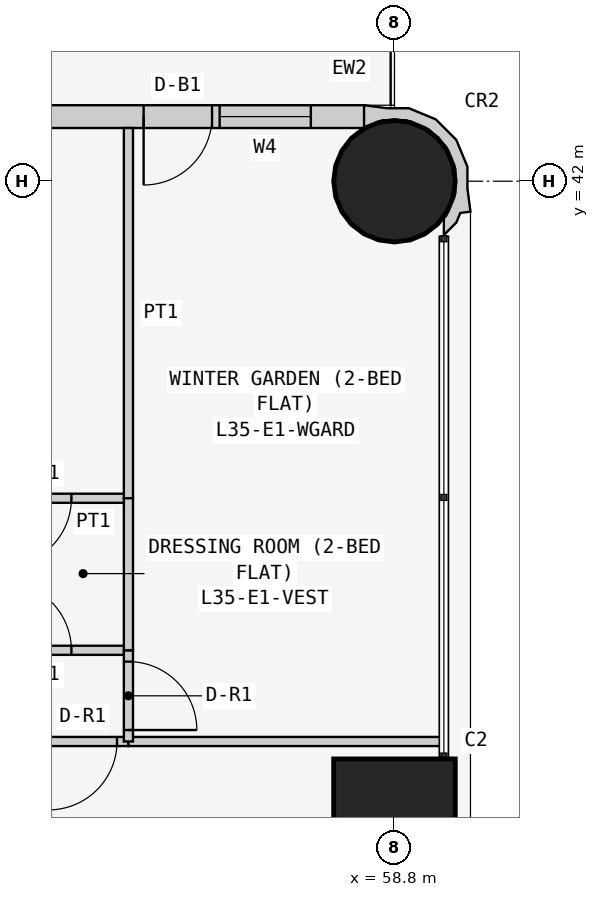
"""IFC4 building model, lengths in metres.
Left out: names, types, materials, properties, quantities, classifications, styles, units other than length and angle.
Written with IfcOpenShell. Run it as: python <this file> out.ifc"""

import sys

from ifc_helpers import new_model, si_unit, direction, frame, frame_2d, origin, origin_2d, place, context, subcontext, project, spatial, polyline, rectangle, circle, outline, extrude, element, fill, save


model = new_model("IFC4")
c1 = context("Model", 3, precision=1e-05, world=origin(), true_north=direction((0.0, 1.0)))
c2 = subcontext(c1, "Body", "Model", "MODEL_VIEW")
j1 = project(units=[si_unit("LENGTHUNIT", "METRE"), si_unit("PLANEANGLEUNIT", "RADIAN")], contexts=[c1])
p1 = place(None, origin())
s1 = spatial("IfcSite", under=j1, at=p1, CompositionType="ELEMENT")
p2 = place(p1, origin())
s2 = spatial("IfcBuilding", under=s1, at=p2, CompositionType="ELEMENT")
p3 = place(p2, frame((0.0, 0.0, 137.7)))
s3 = spatial("IfcBuildingStorey", under=s2, at=p3, CompositionType="ELEMENT", Elevation=137.7)
p4 = place(p3, frame((58.8, 33.6, 0.0), z_axis=(0.0, 0.0, 1.0), x_axis=(1.0, 0.0, 0.0)))
e1 = element("IfcColumn", 1, at=p4, inside=s3, PredefinedType="COLUMN", context=c2, shape_type="SweptSolid", body=[
    extrude(rectangle(XDim=1.6, YDim=1.6, at=origin_2d()), origin(), (0.0, 0.0, 1.0), 3.6),
])
p5 = place(p3, frame((58.8, 42.0, 0.0), z_axis=(0.0, 0.0, 1.0), x_axis=(1.0, 0.0, 0.0)))
e2 = element("IfcColumn", 2, at=p5, inside=s3, PredefinedType="COLUMN", context=c2, shape_type="SweptSolid", body=[
    extrude(circle(Radius=0.8, at=origin_2d()), origin(), (0.0, 0.0, 1.0), 3.6),
])
p6 = place(p3, frame((58.4, 42.85, 0.0), z_axis=(0.0, 0.0, 1.0), x_axis=(-1.0, 0.0, 0.0)))
e3 = element("IfcWall", 3, at=p6, inside=s3, PredefinedType="SOLIDWALL", context=c2, shape_type="SweptSolid", body=[
    extrude(rectangle(XDim=15.7, YDim=0.3, at=frame_2d((7.85, 0.0))), origin(), (0.0, 0.0, 1.0), 3.45),
])
p7 = place(p6, frame((12.4, 0.0, 0.9)))
e4 = element("IfcOpeningElement", 4, at=p7, cuts=e3, PredefinedType="OPENING", context=c2, shape_type="SweptSolid", body=[
    extrude(rectangle(XDim=1.8, YDim=1.5, at=frame_2d((0.9, 0.75))), frame((0.0, 0.16, 0.0), z_axis=(0.0, -1.0, 0.0), x_axis=(1.0, 0.0, 0.0)), (0.0, 0.0, 1.0), 0.32),
])
p8 = place(p6, frame((9.55, 0.0, 1.5)))
e5 = element("IfcOpeningElement", 5, at=p8, cuts=e3, PredefinedType="OPENING", context=c2, shape_type="SweptSolid", body=[
    extrude(rectangle(XDim=0.9, YDim=0.7, at=frame_2d((0.45, 0.35))), frame((0.0, 0.16, 0.0), z_axis=(0.0, -1.0, 0.0), x_axis=(1.0, 0.0, 0.0)), (0.0, 0.0, 1.0), 0.32),
])
p9 = place(p6, frame((5.1, 0.0, 0.9)))
e6 = element("IfcOpeningElement", 6, at=p9, cuts=e3, PredefinedType="OPENING", context=c2, shape_type="SweptSolid", body=[
    extrude(rectangle(XDim=1.8, YDim=1.5, at=frame_2d((0.9, 0.75))), frame((0.0, 0.16, 0.0), z_axis=(0.0, -1.0, 0.0), x_axis=(1.0, 0.0, 0.0)), (0.0, 0.0, 1.0), 0.32),
])
p10 = place(p6, frame((2.0, 0.0, 0.0)))
e7 = element("IfcOpeningElement", 7, at=p10, cuts=e3, PredefinedType="OPENING", context=c2, shape_type="SweptSolid", body=[
    extrude(rectangle(XDim=0.9, YDim=2.4, at=frame_2d((0.45, 1.2))), frame((0.0, 0.16, 0.0), z_axis=(0.0, -1.0, 0.0), x_axis=(1.0, 0.0, 0.0)), (0.0, 0.0, 1.0), 0.32),
])
p11 = place(p6, frame((0.7, 0.0, 0.9)))
e8 = element("IfcOpeningElement", 8, at=p11, cuts=e3, PredefinedType="OPENING", context=c2, shape_type="SweptSolid", body=[
    extrude(rectangle(XDim=1.2, YDim=1.5, at=frame_2d((0.6, 0.75))), frame((0.0, 0.16, 0.0), z_axis=(0.0, -1.0, 0.0), x_axis=(1.0, 0.0, 0.0)), (0.0, 0.0, 1.0), 0.32),
])
p12 = place(p3, frame((59.395, 41.352, 0.0), z_axis=(0.0, 0.0, 1.0), x_axis=(0.93923434088, 0.343276641956, 0.0)))
e9 = element("IfcWall", 9, at=p12, inside=s3, PredefinedType="SOLIDWALL", context=c2, shape_type="SweptSolid", body=[
    extrude(outline(polyline([(0.532, 0.393), (0.631, 0.663), (0.614, 1.044), (0.453, 1.391), (0.172, 1.649), (-0.097, 1.748), (-0.369, 1.89), (-0.509, 1.621), (-0.491, 1.615), (-0.479, 1.609), (-0.211, 1.62), (0.088, 1.511), (0.323, 1.295), (0.457, 1.006), (0.47, 0.688), (0.361, 0.389), (0.145, 0.154), (0.108, 0.136), (0.031, -0.075), (0.241, 0.023), (0.333, 0.124), (0.465, 0.094), (0.532, 0.393)])), origin(), (0.0, 0.0, 1.0), 3.45),
])
p13 = place(p3, frame((55.3, 34.629, 0.0), z_axis=(0.0, 0.0, 1.0), x_axis=(-1.0, 0.0, 0.0)))
e10 = element("IfcWall", 10, at=p13, inside=s3, PredefinedType="PARTITIONING", context=c2, shape_type="SweptSolid", body=[
    extrude(rectangle(XDim=1.2, YDim=0.12, at=frame_2d((0.6, 0.0))), origin(), (0.0, 0.0, 1.0), 3.45),
])
p14 = place(p13, frame((0.15, 0.0, 0.0)))
e11 = element("IfcOpeningElement", 11, at=p14, cuts=e10, PredefinedType="OPENING", context=c2, shape_type="SweptSolid", body=[
    extrude(rectangle(XDim=0.9, YDim=2.1, at=frame_2d((0.45, 1.05))), frame((0.0, 0.07, 0.0), z_axis=(0.0, -1.0, 0.0), x_axis=(1.0, 0.0, 0.0)), (0.0, 0.0, 1.0), 0.14),
])
p15 = place(p3, frame((59.45, 34.629, 0.0), z_axis=(0.0, 0.0, 1.0), x_axis=(-1.0, 0.0, 0.0)))
e12 = element("IfcWall", 12, at=p15, inside=s3, PredefinedType="PARTITIONING", context=c2, shape_type="SweptSolid", body=[
    extrude(rectangle(XDim=4.15, YDim=0.12, at=frame_2d((2.075, 0.0))), origin(), (0.0, 0.0, 1.0), 3.45),
])
p16 = place(p3, frame((55.3, 35.829, 0.0), z_axis=(0.0, 0.0, 1.0), x_axis=(-1.0, 0.0, 0.0)))
e13 = element("IfcWall", 13, at=p16, inside=s3, PredefinedType="PARTITIONING", context=c2, shape_type="SweptSolid", body=[
    extrude(rectangle(XDim=2.3, YDim=0.12, at=frame_2d((1.15, 0.0))), origin(), (0.0, 0.0, 1.0), 3.45),
])
p17 = place(p16, frame((0.75, 0.0, 0.0)))
e14 = element("IfcOpeningElement", 14, at=p17, cuts=e13, PredefinedType="OPENING", context=c2, shape_type="SweptSolid", body=[
    extrude(rectangle(XDim=0.9, YDim=2.1, at=frame_2d((0.45, 1.05))), frame((0.0, 0.07, 0.0), z_axis=(0.0, -1.0, 0.0), x_axis=(1.0, 0.0, 0.0)), (0.0, 0.0, 1.0), 0.14),
])
p18 = place(p3, frame((55.3, 34.629, 0.0), z_axis=(0.0, 0.0, 1.0), x_axis=(0.0, 1.0, 0.0)))
e15 = element("IfcWall", 15, at=p18, inside=s3, PredefinedType="PARTITIONING", context=c2, shape_type="SweptSolid", body=[
    extrude(rectangle(XDim=1.2, YDim=0.12, at=frame_2d((0.6, 0.0))), origin(), (0.0, 0.0, 1.0), 3.45),
])
p19 = place(p18, frame((0.151, 0.0, 0.0)))
e16 = element("IfcOpeningElement", 16, at=p19, cuts=e15, PredefinedType="OPENING", context=c2, shape_type="SweptSolid", body=[
    extrude(rectangle(XDim=0.9, YDim=2.1, at=frame_2d((0.45, 1.05))), frame((0.0, 0.07, 0.0), z_axis=(0.0, -1.0, 0.0), x_axis=(1.0, 0.0, 0.0)), (0.0, 0.0, 1.0), 0.14),
])
p20 = place(p3, frame((55.3, 37.829, 0.0), z_axis=(0.0, 0.0, 1.0), x_axis=(-1.0, 0.0, 0.0)))
e17 = element("IfcWall", 17, at=p20, inside=s3, PredefinedType="PARTITIONING", context=c2, shape_type="SweptSolid", body=[
    extrude(rectangle(XDim=2.3, YDim=0.12, at=frame_2d((1.15, 0.0))), origin(), (0.0, 0.0, 1.0), 3.45),
])
p21 = place(p20, frame((0.75, 0.0, 0.0)))
e18 = element("IfcOpeningElement", 18, at=p21, cuts=e17, PredefinedType="OPENING", context=c2, shape_type="SweptSolid", body=[
    extrude(rectangle(XDim=0.9, YDim=2.1, at=frame_2d((0.45, 1.05))), frame((0.0, 0.07, 0.0), z_axis=(0.0, -1.0, 0.0), x_axis=(1.0, 0.0, 0.0)), (0.0, 0.0, 1.0), 0.14),
])
p22 = place(p3, frame((55.3, 42.7, 0.0), z_axis=(0.0, 0.0, 1.0), x_axis=(0.0, -1.0, 0.0)))
e19 = element("IfcWall", 19, at=p22, inside=s3, PredefinedType="PARTITIONING", context=c2, shape_type="SweptSolid", body=[
    extrude(rectangle(XDim=4.871, YDim=0.12, at=frame_2d((2.436, 0.0))), origin(), (0.0, 0.0, 1.0), 3.45),
])
p23 = place(p3, frame((55.3, 35.829, 0.0), z_axis=(0.0, 0.0, 1.0), x_axis=(0.0, 1.0, 0.0)))
e20 = element("IfcWall", 20, at=p23, inside=s3, PredefinedType="PARTITIONING", context=c2, shape_type="SweptSolid", body=[
    extrude(rectangle(XDim=2.0, YDim=0.12, at=frame_2d((1.0, 0.0))), origin(), (0.0, 0.0, 1.0), 3.45),
])
p24 = place(p10, origin())
e21 = element("IfcDoor", 21, at=p24, inside=s3, OperationType="SINGLE_SWING_RIGHT", PredefinedType="DOOR", context=c2, shape_type="SweptSolid", body=[
    extrude(rectangle(XDim=0.9, YDim=2.4, at=frame_2d((0.45, 1.2))), frame((0.0, 0.025, 0.0), z_axis=(0.0, -1.0, 0.0), x_axis=(1.0, 0.0, 0.0)), (0.0, 0.0, 1.0), 0.05),
])
fill(e7, e21)
p25 = place(p11, origin())
e22 = element("IfcWindow", 22, at=p25, inside=s3, PartitioningType="SINGLE_PANEL", PredefinedType="WINDOW", context=c2, shape_type="SweptSolid", body=[
    extrude(rectangle(XDim=1.2, YDim=1.5, at=frame_2d((0.6, 0.75))), frame((0.0, 0.03, 0.0), z_axis=(0.0, -1.0, 0.0), x_axis=(1.0, 0.0, 0.0)), (0.0, 0.0, 1.0), 0.06),
])
fill(e8, e22)
p26 = place(p14, origin())
e23 = element("IfcDoor", 23, at=p26, inside=s3, OperationType="SINGLE_SWING_RIGHT", PredefinedType="DOOR", context=c2, shape_type="SweptSolid", body=[
    extrude(rectangle(XDim=0.9, YDim=2.1, at=frame_2d((0.45, 1.05))), frame((0.0, 0.025, 0.0), z_axis=(0.0, -1.0, 0.0), x_axis=(1.0, 0.0, 0.0)), (0.0, 0.0, 1.0), 0.05),
])
fill(e11, e23)
p27 = place(p17, frame((0.9, 0.0, 0.0), z_axis=(0.0, 0.0, 1.0), x_axis=(-1.0, 0.0, 0.0)))
e24 = element("IfcDoor", 24, at=p27, inside=s3, OperationType="SINGLE_SWING_LEFT", PredefinedType="DOOR", context=c2, shape_type="SweptSolid", body=[
    extrude(rectangle(XDim=0.9, YDim=2.1, at=frame_2d((0.45, 1.05))), frame((0.0, 0.025, 0.0), z_axis=(0.0, -1.0, 0.0), x_axis=(1.0, 0.0, 0.0)), (0.0, 0.0, 1.0), 0.05),
])
fill(e14, e24)
p28 = place(p21, origin())
e25 = element("IfcDoor", 25, at=p28, inside=s3, OperationType="SINGLE_SWING_RIGHT", PredefinedType="DOOR", context=c2, shape_type="SweptSolid", body=[
    extrude(rectangle(XDim=0.9, YDim=2.1, at=frame_2d((0.45, 1.05))), frame((0.0, 0.025, 0.0), z_axis=(0.0, -1.0, 0.0), x_axis=(1.0, 0.0, 0.0)), (0.0, 0.0, 1.0), 0.05),
])
fill(e18, e25)
p29 = place(p19, frame((0.9, 0.0, 0.0), z_axis=(0.0, 0.0, 1.0), x_axis=(-1.0, 0.0, 0.0)))
e26 = element("IfcDoor", 26, at=p29, inside=s3, OperationType="SINGLE_SWING_RIGHT", PredefinedType="DOOR", context=c2, shape_type="SweptSolid", body=[
    extrude(rectangle(XDim=0.9, YDim=2.1, at=frame_2d((0.45, 1.05))), frame((0.0, 0.025, 0.0), z_axis=(0.0, -1.0, 0.0), x_axis=(1.0, 0.0, 0.0)), (0.0, 0.0, 1.0), 0.05),
])
fill(e16, e26)
save(model, sys.argv[1])
